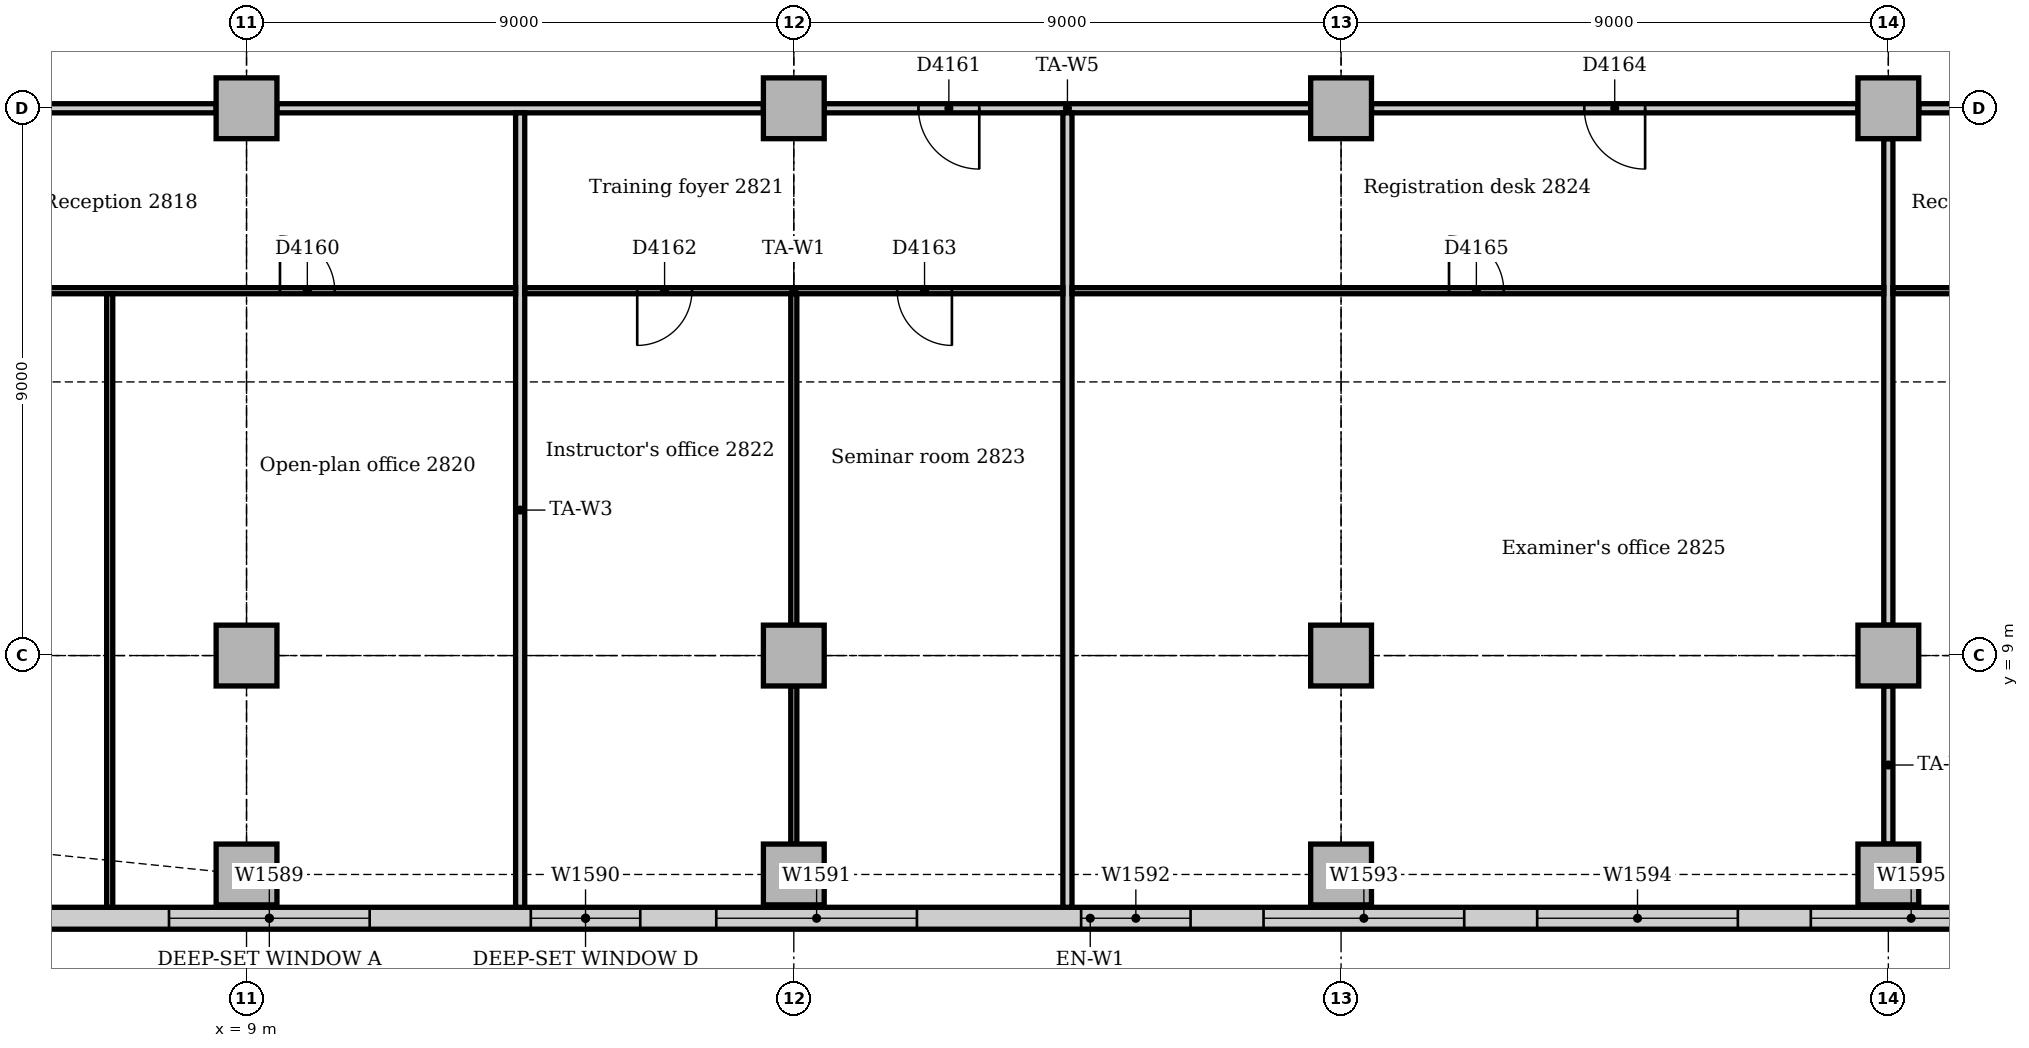
"""IFC4 building model, lengths in metres.
Left out: names, types, materials, properties, quantities, classifications, styles, units other than length and angle.
Written with IfcOpenShell. Run it as: python <this file> out.ifc"""

import sys

from ifc_helpers import new_model, si_unit, direction, frame, frame_2d, origin, origin_2d, place, context, subcontext, project, spatial, rectangle, extrude, element, fill, save


model = new_model("IFC4")
c1 = context("Model", 3, precision=1e-05, world=origin(), true_north=direction((0.0, 1.0)))
c2 = subcontext(c1, "Body", "Model", "MODEL_VIEW")
j1 = project(units=[si_unit("LENGTHUNIT", "METRE"), si_unit("PLANEANGLEUNIT", "RADIAN")], contexts=[c1])
p1 = place(None, origin())
s1 = spatial("IfcSite", under=j1, at=p1, CompositionType="ELEMENT")
p2 = place(p1, origin())
s2 = spatial("IfcBuilding", under=s1, at=p2, CompositionType="ELEMENT")
p3 = place(p2, frame((0.0, 0.0, 120.0)))
s3 = spatial("IfcBuildingStorey", under=s2, at=p3, CompositionType="ELEMENT", Elevation=120.0)
for number, where, z_axis, x_axis in (
    (1, (9.0, 5.4, 0.0), (0.0, 0.0, 1.0), (1.0, 0.0, 0.0)),
    (2, (18.0, 5.4, 0.0), (0.0, 0.0, 1.0), (1.0, 0.0, 0.0)),
    (3, (27.0, 5.4, 0.0), (0.0, 0.0, 1.0), (1.0, 0.0, 0.0)),
    (4, (36.0, 5.4, 0.0), (0.0, 0.0, 1.0), (1.0, 0.0, 0.0)),
    (5, (9.0, 9.0, 0.0), (0.0, 0.0, 1.0), (1.0, 0.0, 0.0)),
    (6, (9.0, 18.0, 0.0), (0.0, 0.0, 1.0), (1.0, 0.0, 0.0)),
    (7, (18.0, 9.0, 0.0), (0.0, 0.0, 1.0), (1.0, 0.0, 0.0)),
    (8, (18.0, 18.0, 0.0), (0.0, 0.0, 1.0), (1.0, 0.0, 0.0)),
    (9, (27.0, 9.0, 0.0), (0.0, 0.0, 1.0), (1.0, 0.0, 0.0)),
    (10, (27.0, 18.0, 0.0), (0.0, 0.0, 1.0), (1.0, 0.0, 0.0)),
    (11, (36.0, 9.0, 0.0), (0.0, 0.0, 1.0), (1.0, 0.0, 0.0)),
    (12, (36.0, 18.0, 0.0), (0.0, 0.0, 1.0), (1.0, 0.0, 0.0)),
):
    element("IfcColumn", number, at=place(p3, frame(where, z_axis=z_axis, x_axis=x_axis)), inside=s3, PredefinedType="COLUMN", context=c2, shape_type="SweptSolid", body=[
        extrude(rectangle(XDim=1.0, YDim=1.0, at=origin_2d()), origin(), (0.0, 0.0, 1.0), 3.85),
    ])
p4 = place(p3, frame((4.243, 4.68, 0.0), z_axis=(0.0, 0.0, 1.0), x_axis=(1.0, 0.0, 0.0)))
e13 = element("IfcWall", 13, at=p4, inside=s3, PredefinedType="STANDARD", context=c2, shape_type="SweptSolid", body=[
    extrude(rectangle(XDim=37.265, YDim=0.36, at=frame_2d((18.632, 0.0))), origin(), (0.0, 0.0, 1.0), 3.85),
])
p5 = place(p4, frame((3.482, 0.0, 0.9)))
e14 = element("IfcOpeningElement", 14, at=p5, cuts=e13, PredefinedType="OPENING", context=c2, shape_type="SweptSolid", body=[
    extrude(rectangle(XDim=3.3, YDim=1.6, at=frame_2d((1.65, 0.8))), frame((0.0, 0.19, 0.0), z_axis=(0.0, -1.0, 0.0), x_axis=(1.0, 0.0, 0.0)), (0.0, 0.0, 1.0), 0.38),
])
p6 = place(p4, frame((9.432, 0.0, 0.9)))
e15 = element("IfcOpeningElement", 15, at=p6, cuts=e13, PredefinedType="OPENING", context=c2, shape_type="SweptSolid", body=[
    extrude(rectangle(XDim=1.8, YDim=1.6, at=frame_2d((0.9, 0.8))), frame((0.0, 0.19, 0.0), z_axis=(0.0, -1.0, 0.0), x_axis=(1.0, 0.0, 0.0)), (0.0, 0.0, 1.0), 0.38),
])
p7 = place(p4, frame((12.482, 0.0, 0.9)))
e16 = element("IfcOpeningElement", 16, at=p7, cuts=e13, PredefinedType="OPENING", context=c2, shape_type="SweptSolid", body=[
    extrude(rectangle(XDim=3.3, YDim=1.6, at=frame_2d((1.65, 0.8))), frame((0.0, 0.19, 0.0), z_axis=(0.0, -1.0, 0.0), x_axis=(1.0, 0.0, 0.0)), (0.0, 0.0, 1.0), 0.38),
])
p8 = place(p4, frame((18.482, 0.0, 0.9)))
e17 = element("IfcOpeningElement", 17, at=p8, cuts=e13, PredefinedType="OPENING", context=c2, shape_type="SweptSolid", body=[
    extrude(rectangle(XDim=1.8, YDim=1.6, at=frame_2d((0.9, 0.8))), frame((0.0, 0.19, 0.0), z_axis=(0.0, -1.0, 0.0), x_axis=(1.0, 0.0, 0.0)), (0.0, 0.0, 1.0), 0.38),
])
p9 = place(p4, frame((21.482, 0.0, 0.9)))
e18 = element("IfcOpeningElement", 18, at=p9, cuts=e13, PredefinedType="OPENING", context=c2, shape_type="SweptSolid", body=[
    extrude(rectangle(XDim=3.3, YDim=1.6, at=frame_2d((1.65, 0.8))), frame((0.0, 0.19, 0.0), z_axis=(0.0, -1.0, 0.0), x_axis=(1.0, 0.0, 0.0)), (0.0, 0.0, 1.0), 0.38),
])
p10 = place(p4, frame((25.982, 0.0, 0.9)))
e19 = element("IfcOpeningElement", 19, at=p10, cuts=e13, PredefinedType="OPENING", context=c2, shape_type="SweptSolid", body=[
    extrude(rectangle(XDim=3.3, YDim=1.6, at=frame_2d((1.65, 0.8))), frame((0.0, 0.19, 0.0), z_axis=(0.0, -1.0, 0.0), x_axis=(1.0, 0.0, 0.0)), (0.0, 0.0, 1.0), 0.38),
])
p11 = place(p4, frame((30.482, 0.0, 0.9)))
e20 = element("IfcOpeningElement", 20, at=p11, cuts=e13, PredefinedType="OPENING", context=c2, shape_type="SweptSolid", body=[
    extrude(rectangle(XDim=3.3, YDim=1.6, at=frame_2d((1.65, 0.8))), frame((0.0, 0.19, 0.0), z_axis=(0.0, -1.0, 0.0), x_axis=(1.0, 0.0, 0.0)), (0.0, 0.0, 1.0), 0.38),
])
p12 = place(p3, frame((36.5, 18.0, 0.0), z_axis=(0.0, 0.0, 1.0), x_axis=(1.0, 0.0, 0.0)))
e21 = element("IfcWall", 21, at=p12, inside=s3, PredefinedType="PARTITIONING", context=c2, shape_type="SweptSolid", body=[
    extrude(rectangle(XDim=8.0, YDim=0.15, at=frame_2d((4.0, 0.0))), origin(), (0.0, 0.0, 1.0), 3.158),
])
p13 = place(p12, frame((3.5, 0.0, 0.0)))
e22 = element("IfcOpeningElement", 22, at=p13, cuts=e21, PredefinedType="OPENING", context=c2, shape_type="SweptSolid", body=[
    extrude(rectangle(XDim=1.0, YDim=2.1, at=frame_2d((0.5, 1.05))), frame((0.0, 0.085, 0.0), z_axis=(0.0, -1.0, 0.0), x_axis=(1.0, 0.0, 0.0)), (0.0, 0.0, 1.0), 0.17),
])
p14 = place(p3, frame((27.5, 18.0, 0.0), z_axis=(0.0, 0.0, 1.0), x_axis=(1.0, 0.0, 0.0)))
e23 = element("IfcWall", 23, at=p14, inside=s3, PredefinedType="PARTITIONING", context=c2, shape_type="SweptSolid", body=[
    extrude(rectangle(XDim=8.0, YDim=0.15, at=frame_2d((4.0, 0.0))), origin(), (0.0, 0.0, 1.0), 3.158),
])
p15 = place(p14, frame((3.5, 0.0, 0.0)))
e24 = element("IfcOpeningElement", 24, at=p15, cuts=e23, PredefinedType="OPENING", context=c2, shape_type="SweptSolid", body=[
    extrude(rectangle(XDim=1.0, YDim=2.1, at=frame_2d((0.5, 1.05))), frame((0.0, 0.085, 0.0), z_axis=(0.0, -1.0, 0.0), x_axis=(1.0, 0.0, 0.0)), (0.0, 0.0, 1.0), 0.17),
])
p16 = place(p3, frame((18.5, 18.0, 0.0), z_axis=(0.0, 0.0, 1.0), x_axis=(1.0, 0.0, 0.0)))
e25 = element("IfcWall", 25, at=p16, inside=s3, PredefinedType="PARTITIONING", context=c2, shape_type="SweptSolid", body=[
    extrude(rectangle(XDim=8.0, YDim=0.15, at=frame_2d((4.0, 0.0))), origin(), (0.0, 0.0, 1.0), 3.158),
])
p17 = place(p16, frame((1.55, 0.0, 0.0)))
e26 = element("IfcOpeningElement", 26, at=p17, cuts=e25, PredefinedType="OPENING", context=c2, shape_type="SweptSolid", body=[
    extrude(rectangle(XDim=1.0, YDim=2.1, at=frame_2d((0.5, 1.05))), frame((0.0, 0.085, 0.0), z_axis=(0.0, -1.0, 0.0), x_axis=(1.0, 0.0, 0.0)), (0.0, 0.0, 1.0), 0.17),
])
p18 = place(p3, frame((9.5, 18.0, 0.0), z_axis=(0.0, 0.0, 1.0), x_axis=(1.0, 0.0, 0.0)))
e27 = element("IfcWall", 27, at=p18, inside=s3, PredefinedType="PARTITIONING", context=c2, shape_type="SweptSolid", body=[
    extrude(rectangle(XDim=8.0, YDim=0.15, at=frame_2d((4.0, 0.0))), origin(), (0.0, 0.0, 1.0), 3.158),
])
p19 = place(p3, frame((1.4, 18.0, 0.0), z_axis=(0.0, 0.0, 1.0), x_axis=(1.0, 0.0, 0.0)))
e28 = element("IfcWall", 28, at=p19, inside=s3, PredefinedType="PARTITIONING", context=c2, shape_type="SweptSolid", body=[
    extrude(rectangle(XDim=7.1, YDim=0.15, at=frame_2d((3.55, 0.0))), origin(), (0.0, 0.0, 1.0), 3.158),
])
p20 = place(p19, frame((3.05, 0.0, 0.0)))
e29 = element("IfcOpeningElement", 29, at=p20, cuts=e28, PredefinedType="OPENING", context=c2, shape_type="SweptSolid", body=[
    extrude(rectangle(XDim=1.0, YDim=2.1, at=frame_2d((0.5, 1.05))), frame((0.0, 0.085, 0.0), z_axis=(0.0, -1.0, 0.0), x_axis=(1.0, 0.0, 0.0)), (0.0, 0.0, 1.0), 0.17),
])
for number, where, z_axis, x_axis in (
    (30, (13.5, 4.86, 0.0), (0.0, 0.0, 1.0), (0.0, 1.0, 0.0)),
    (31, (22.5, 4.86, 0.0), (0.0, 0.0, 1.0), (0.0, 1.0, 0.0)),
):
    element("IfcWall", number, at=place(p3, frame(where, z_axis=z_axis, x_axis=x_axis)), inside=s3, PredefinedType="PARTITIONING", context=c2, shape_type="SweptSolid", body=[
        extrude(rectangle(XDim=13.065, YDim=0.15, at=frame_2d((6.532, 0.0))), origin(), (0.0, 0.0, 1.0), 3.85),
    ])
p21 = place(p3, frame((36.0, 5.9, 0.0), z_axis=(0.0, 0.0, 1.0), x_axis=(0.0, 1.0, 0.0)))
e32 = element("IfcWall", 32, at=p21, inside=s3, PredefinedType="PARTITIONING", context=c2, shape_type="SweptSolid", body=[
    extrude(rectangle(XDim=2.6, YDim=0.15, at=frame_2d((1.3, 0.0))), origin(), (0.0, 0.0, 1.0), 3.652),
])
p22 = place(p3, frame((36.0, 9.5, 0.0), z_axis=(0.0, 0.0, 1.0), x_axis=(0.0, 1.0, 0.0)))
e33 = element("IfcWall", 33, at=p22, inside=s3, PredefinedType="PARTITIONING", context=c2, shape_type="SweptSolid", body=[
    extrude(rectangle(XDim=8.0, YDim=0.15, at=frame_2d((4.0, 0.0))), origin(), (0.0, 0.0, 1.0), 3.256),
])
p23 = place(p3, frame((36.075, 15.0, 0.0), z_axis=(0.0, 0.0, 1.0), x_axis=(1.0, 0.0, 0.0)))
e34 = element("IfcWall", 34, at=p23, inside=s3, PredefinedType="PARTITIONING", context=c2, shape_type="SweptSolid", body=[
    extrude(rectangle(XDim=15.315, YDim=0.1, at=frame_2d((7.657, 0.0))), origin(), (0.0, 0.0, 1.0), 3.85),
])
p24 = place(p23, frame((3.5, 0.0, 0.0)))
e35 = element("IfcOpeningElement", 35, at=p24, cuts=e34, PredefinedType="OPENING", context=c2, shape_type="SweptSolid", body=[
    extrude(rectangle(XDim=0.9, YDim=2.1, at=frame_2d((0.45, 1.05))), frame((0.0, 0.06, 0.0), z_axis=(0.0, -1.0, 0.0), x_axis=(1.0, 0.0, 0.0)), (0.0, 0.0, 1.0), 0.12),
])
p25 = place(p23, frame((11.05, 0.0, 0.0)))
e36 = element("IfcOpeningElement", 36, at=p25, cuts=e34, PredefinedType="OPENING", context=c2, shape_type="SweptSolid", body=[
    extrude(rectangle(XDim=0.9, YDim=2.1, at=frame_2d((0.45, 1.05))), frame((0.0, 0.06, 0.0), z_axis=(0.0, -1.0, 0.0), x_axis=(1.0, 0.0, 0.0)), (0.0, 0.0, 1.0), 0.12),
])
p26 = place(p3, frame((22.575, 15.0, 0.0), z_axis=(0.0, 0.0, 1.0), x_axis=(1.0, 0.0, 0.0)))
e37 = element("IfcWall", 37, at=p26, inside=s3, PredefinedType="PARTITIONING", context=c2, shape_type="SweptSolid", body=[
    extrude(rectangle(XDim=13.35, YDim=0.1, at=frame_2d((6.675, 0.0))), origin(), (0.0, 0.0, 1.0), 3.85),
])
p27 = place(p26, frame((6.2, 0.0, 0.0)))
e38 = element("IfcOpeningElement", 38, at=p27, cuts=e37, PredefinedType="OPENING", context=c2, shape_type="SweptSolid", body=[
    extrude(rectangle(XDim=0.9, YDim=2.1, at=frame_2d((0.45, 1.05))), frame((0.0, 0.06, 0.0), z_axis=(0.0, -1.0, 0.0), x_axis=(1.0, 0.0, 0.0)), (0.0, 0.0, 1.0), 0.12),
])
p28 = place(p3, frame((13.575, 15.0, 0.0), z_axis=(0.0, 0.0, 1.0), x_axis=(1.0, 0.0, 0.0)))
e39 = element("IfcWall", 39, at=p28, inside=s3, PredefinedType="PARTITIONING", context=c2, shape_type="SweptSolid", body=[
    extrude(rectangle(XDim=8.85, YDim=0.1, at=frame_2d((4.425, 0.0))), origin(), (0.0, 0.0, 1.0), 3.85),
])
p29 = place(p28, frame((1.85, 0.0, 0.0)))
e40 = element("IfcOpeningElement", 40, at=p29, cuts=e39, PredefinedType="OPENING", context=c2, shape_type="SweptSolid", body=[
    extrude(rectangle(XDim=0.9, YDim=2.1, at=frame_2d((0.45, 1.05))), frame((0.0, 0.06, 0.0), z_axis=(0.0, -1.0, 0.0), x_axis=(1.0, 0.0, 0.0)), (0.0, 0.0, 1.0), 0.12),
])
p30 = place(p28, frame((6.125, 0.0, 0.0)))
e41 = element("IfcOpeningElement", 41, at=p30, cuts=e39, PredefinedType="OPENING", context=c2, shape_type="SweptSolid", body=[
    extrude(rectangle(XDim=0.9, YDim=2.1, at=frame_2d((0.45, 1.05))), frame((0.0, 0.06, 0.0), z_axis=(0.0, -1.0, 0.0), x_axis=(1.0, 0.0, 0.0)), (0.0, 0.0, 1.0), 0.12),
])
p31 = place(p3, frame((0.36, 15.0, 0.0), z_axis=(0.0, 0.0, 1.0), x_axis=(1.0, 0.0, 0.0)))
e42 = element("IfcWall", 42, at=p31, inside=s3, PredefinedType="PARTITIONING", context=c2, shape_type="SweptSolid", body=[
    extrude(rectangle(XDim=13.065, YDim=0.1, at=frame_2d((6.532, 0.0))), origin(), (0.0, 0.0, 1.0), 3.85),
])
p32 = place(p31, frame((2.8, 0.0, 0.0)))
e43 = element("IfcOpeningElement", 43, at=p32, cuts=e42, PredefinedType="OPENING", context=c2, shape_type="SweptSolid", body=[
    extrude(rectangle(XDim=0.9, YDim=2.1, at=frame_2d((0.45, 1.05))), frame((0.0, 0.06, 0.0), z_axis=(0.0, -1.0, 0.0), x_axis=(1.0, 0.0, 0.0)), (0.0, 0.0, 1.0), 0.12),
])
p33 = place(p31, frame((9.19, 0.0, 0.0)))
e44 = element("IfcOpeningElement", 44, at=p33, cuts=e42, PredefinedType="OPENING", context=c2, shape_type="SweptSolid", body=[
    extrude(rectangle(XDim=0.9, YDim=2.1, at=frame_2d((0.45, 1.05))), frame((0.0, 0.06, 0.0), z_axis=(0.0, -1.0, 0.0), x_axis=(1.0, 0.0, 0.0)), (0.0, 0.0, 1.0), 0.12),
])
p34 = place(p3, frame((6.75, 4.86, 0.0), z_axis=(0.0, 0.0, 1.0), x_axis=(0.0, 1.0, 0.0)))
e45 = element("IfcWall", 45, at=p34, inside=s3, PredefinedType="PARTITIONING", context=c2, shape_type="SweptSolid", body=[
    extrude(rectangle(XDim=10.09, YDim=0.1, at=frame_2d((5.045, 0.0))), origin(), (0.0, 0.0, 1.0), 3.85),
])
p35 = place(p3, frame((18.0, 5.9, 0.0), z_axis=(0.0, 0.0, 1.0), x_axis=(0.0, 1.0, 0.0)))
e46 = element("IfcWall", 46, at=p35, inside=s3, PredefinedType="PARTITIONING", context=c2, shape_type="SweptSolid", body=[
    extrude(rectangle(XDim=2.6, YDim=0.1, at=frame_2d((1.3, 0.0))), origin(), (0.0, 0.0, 1.0), 3.652),
])
p36 = place(p3, frame((18.0, 9.5, 0.0), z_axis=(0.0, 0.0, 1.0), x_axis=(0.0, 1.0, 0.0)))
e47 = element("IfcWall", 47, at=p36, inside=s3, PredefinedType="PARTITIONING", context=c2, shape_type="SweptSolid", body=[
    extrude(rectangle(XDim=5.45, YDim=0.1, at=frame_2d((2.725, 0.0))), origin(), (0.0, 0.0, 1.0), 3.256),
])
p37 = place(p5, origin())
e48 = element("IfcWindow", 48, at=p37, inside=s3, PartitioningType="SINGLE_PANEL", PredefinedType="WINDOW", context=c2, shape_type="SweptSolid", body=[
    extrude(rectangle(XDim=3.3, YDim=1.6, at=frame_2d((1.65, 0.8))), frame((0.0, 0.13, 0.0), z_axis=(0.0, -1.0, 0.0), x_axis=(1.0, 0.0, 0.0)), (0.0, 0.0, 1.0), 0.06),
])
fill(e14, e48)
p38 = place(p6, origin())
e49 = element("IfcWindow", 49, at=p38, inside=s3, PartitioningType="SINGLE_PANEL", PredefinedType="WINDOW", context=c2, shape_type="SweptSolid", body=[
    extrude(rectangle(XDim=1.8, YDim=1.6, at=frame_2d((0.9, 0.8))), frame((0.0, 0.13, 0.0), z_axis=(0.0, -1.0, 0.0), x_axis=(1.0, 0.0, 0.0)), (0.0, 0.0, 1.0), 0.06),
])
fill(e15, e49)
p39 = place(p7, origin())
e50 = element("IfcWindow", 50, at=p39, inside=s3, PartitioningType="SINGLE_PANEL", PredefinedType="WINDOW", context=c2, shape_type="SweptSolid", body=[
    extrude(rectangle(XDim=3.3, YDim=1.6, at=frame_2d((1.65, 0.8))), frame((0.0, 0.13, 0.0), z_axis=(0.0, -1.0, 0.0), x_axis=(1.0, 0.0, 0.0)), (0.0, 0.0, 1.0), 0.06),
])
fill(e16, e50)
p40 = place(p8, origin())
e51 = element("IfcWindow", 51, at=p40, inside=s3, PartitioningType="SINGLE_PANEL", PredefinedType="WINDOW", context=c2, shape_type="SweptSolid", body=[
    extrude(rectangle(XDim=1.8, YDim=1.6, at=frame_2d((0.9, 0.8))), frame((0.0, 0.13, 0.0), z_axis=(0.0, -1.0, 0.0), x_axis=(1.0, 0.0, 0.0)), (0.0, 0.0, 1.0), 0.06),
])
fill(e17, e51)
p41 = place(p9, origin())
e52 = element("IfcWindow", 52, at=p41, inside=s3, PartitioningType="SINGLE_PANEL", PredefinedType="WINDOW", context=c2, shape_type="SweptSolid", body=[
    extrude(rectangle(XDim=3.3, YDim=1.6, at=frame_2d((1.65, 0.8))), frame((0.0, 0.13, 0.0), z_axis=(0.0, -1.0, 0.0), x_axis=(1.0, 0.0, 0.0)), (0.0, 0.0, 1.0), 0.06),
])
fill(e18, e52)
p42 = place(p10, origin())
e53 = element("IfcWindow", 53, at=p42, inside=s3, PartitioningType="SINGLE_PANEL", PredefinedType="WINDOW", context=c2, shape_type="SweptSolid", body=[
    extrude(rectangle(XDim=3.3, YDim=1.6, at=frame_2d((1.65, 0.8))), frame((0.0, 0.13, 0.0), z_axis=(0.0, -1.0, 0.0), x_axis=(1.0, 0.0, 0.0)), (0.0, 0.0, 1.0), 0.06),
])
fill(e19, e53)
p43 = place(p11, origin())
e54 = element("IfcWindow", 54, at=p43, inside=s3, PartitioningType="SINGLE_PANEL", PredefinedType="WINDOW", context=c2, shape_type="SweptSolid", body=[
    extrude(rectangle(XDim=3.3, YDim=1.6, at=frame_2d((1.65, 0.8))), frame((0.0, 0.13, 0.0), z_axis=(0.0, -1.0, 0.0), x_axis=(1.0, 0.0, 0.0)), (0.0, 0.0, 1.0), 0.06),
])
fill(e20, e54)
p44 = place(p33, origin())
e55 = element("IfcDoor", 55, at=p44, inside=s3, OperationType="SINGLE_SWING_LEFT", PredefinedType="DOOR", context=c2, shape_type="SweptSolid", body=[
    extrude(rectangle(XDim=0.9, YDim=2.1, at=frame_2d((0.45, 1.05))), frame((0.0, 0.025, 0.0), z_axis=(0.0, -1.0, 0.0), x_axis=(1.0, 0.0, 0.0)), (0.0, 0.0, 1.0), 0.05),
])
fill(e44, e55)
p45 = place(p17, frame((1.0, 0.0, 0.0), z_axis=(0.0, 0.0, 1.0), x_axis=(-1.0, 0.0, 0.0)))
e56 = element("IfcDoor", 56, at=p45, inside=s3, OperationType="SINGLE_SWING_LEFT", PredefinedType="DOOR", context=c2, shape_type="SweptSolid", body=[
    extrude(rectangle(XDim=1.0, YDim=2.1, at=frame_2d((0.5, 1.05))), frame((0.0, 0.025, 0.0), z_axis=(0.0, -1.0, 0.0), x_axis=(1.0, 0.0, 0.0)), (0.0, 0.0, 1.0), 0.05),
])
fill(e26, e56)
p46 = place(p29, frame((0.9, 0.0, 0.0), z_axis=(0.0, 0.0, 1.0), x_axis=(-1.0, 0.0, 0.0)))
e57 = element("IfcDoor", 57, at=p46, inside=s3, OperationType="SINGLE_SWING_RIGHT", PredefinedType="DOOR", context=c2, shape_type="SweptSolid", body=[
    extrude(rectangle(XDim=0.9, YDim=2.1, at=frame_2d((0.45, 1.05))), frame((0.0, 0.025, 0.0), z_axis=(0.0, -1.0, 0.0), x_axis=(1.0, 0.0, 0.0)), (0.0, 0.0, 1.0), 0.05),
])
fill(e40, e57)
p47 = place(p30, frame((0.9, 0.0, 0.0), z_axis=(0.0, 0.0, 1.0), x_axis=(-1.0, 0.0, 0.0)))
e58 = element("IfcDoor", 58, at=p47, inside=s3, OperationType="SINGLE_SWING_LEFT", PredefinedType="DOOR", context=c2, shape_type="SweptSolid", body=[
    extrude(rectangle(XDim=0.9, YDim=2.1, at=frame_2d((0.45, 1.05))), frame((0.0, 0.025, 0.0), z_axis=(0.0, -1.0, 0.0), x_axis=(1.0, 0.0, 0.0)), (0.0, 0.0, 1.0), 0.05),
])
fill(e41, e58)
p48 = place(p15, frame((1.0, 0.0, 0.0), z_axis=(0.0, 0.0, 1.0), x_axis=(-1.0, 0.0, 0.0)))
e59 = element("IfcDoor", 59, at=p48, inside=s3, OperationType="SINGLE_SWING_LEFT", PredefinedType="DOOR", context=c2, shape_type="SweptSolid", body=[
    extrude(rectangle(XDim=1.0, YDim=2.1, at=frame_2d((0.5, 1.05))), frame((0.0, 0.025, 0.0), z_axis=(0.0, -1.0, 0.0), x_axis=(1.0, 0.0, 0.0)), (0.0, 0.0, 1.0), 0.05),
])
fill(e24, e59)
p49 = place(p27, origin())
e60 = element("IfcDoor", 60, at=p49, inside=s3, OperationType="SINGLE_SWING_LEFT", PredefinedType="DOOR", context=c2, shape_type="SweptSolid", body=[
    extrude(rectangle(XDim=0.9, YDim=2.1, at=frame_2d((0.45, 1.05))), frame((0.0, 0.025, 0.0), z_axis=(0.0, -1.0, 0.0), x_axis=(1.0, 0.0, 0.0)), (0.0, 0.0, 1.0), 0.05),
])
fill(e38, e60)
save(model, sys.argv[1])
